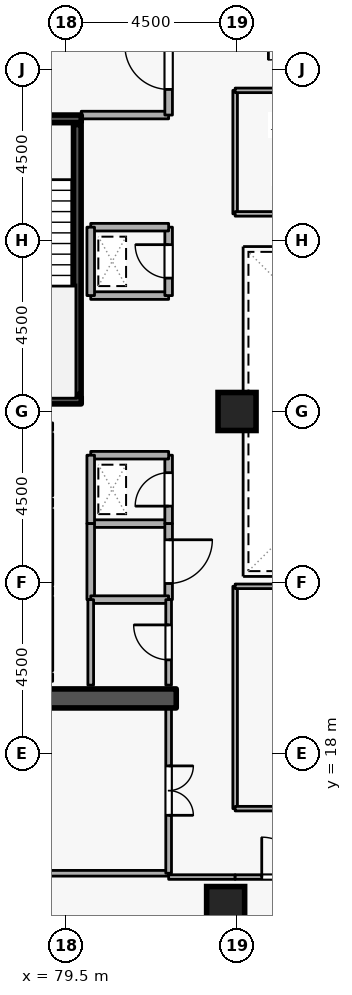
"""IFC4 building model, lengths in metres.
Left out: names, types, materials, properties, quantities, classifications, styles, units other than length and angle.
Written with IfcOpenShell. Run it as: python <this file> out.ifc"""

import sys

from ifc_helpers import new_model, si_unit, direction, frame, frame_2d, origin, origin_2d, place, context, subcontext, project, spatial, rectangle, extrude, element, fill, save


model = new_model("IFC4")
c1 = context("Model", 3, precision=1e-05, world=origin(), true_north=direction((0.0, 1.0)))
c2 = subcontext(c1, "Body", "Model", "MODEL_VIEW")
j1 = project(units=[si_unit("LENGTHUNIT", "METRE"), si_unit("PLANEANGLEUNIT", "RADIAN")], contexts=[c1])
p1 = place(None, origin())
s1 = spatial("IfcSite", under=j1, at=p1, CompositionType="ELEMENT")
p2 = place(p1, origin())
s2 = spatial("IfcBuilding", under=s1, at=p2, CompositionType="ELEMENT")
p3 = place(p2, frame((0.0, 0.0, 229.5)))
s3 = spatial("IfcBuildingStorey", under=s2, at=p3, CompositionType="ELEMENT", Elevation=229.5)
p4 = place(p3, frame((76.6, 19.45, 0.0), z_axis=(0.0, 0.0, 1.0), x_axis=(1.0, 0.0, 0.0)))
e1 = element("IfcWall", 1, at=p4, inside=s3, PredefinedType="SHEAR", context=c2, shape_type="SweptSolid", body=[
    extrude(rectangle(XDim=5.8, YDim=0.5, at=frame_2d((2.9, 0.0))), origin(), (0.0, 0.0, 1.0), 3.6),
])
for number, where, z_axis, x_axis in (
    (2, (83.7, 14.0, 0.0), (0.0, 0.0, 1.0), (1.0, 0.0, 0.0)),
    (3, (84.0, 27.0, 0.0), (0.0, 0.0, 1.0), (1.0, 0.0, 0.0)),
):
    element("IfcColumn", number, at=place(p3, frame(where, z_axis=z_axis, x_axis=x_axis)), inside=s3, PredefinedType="COLUMN", context=c2, shape_type="SweptSolid", body=[
        extrude(rectangle(XDim=1.0, YDim=1.0, at=origin_2d()), origin(), (0.0, 0.0, 1.0), 3.6),
    ])
p5 = place(p3, frame((79.05, 24.78, 0.0), z_axis=(0.0, 0.0, 1.0), x_axis=(0.0, 1.0, 0.0)))
e4 = element("IfcWall", 4, at=p5, inside=s3, PredefinedType="STANDARD", context=c2, shape_type="SweptSolid", body=[
    extrude(rectangle(XDim=1.64, YDim=0.2, at=frame_2d((0.82, 0.0))), origin(), (0.0, 0.0, 1.0), 3.3),
])
p6 = place(p5, frame((0.31, 0.0, 0.0)))
e5 = element("IfcOpeningElement", 5, at=p6, cuts=e4, PredefinedType="OPENING", context=c2, shape_type="SweptSolid", body=[
    extrude(rectangle(XDim=1.02, YDim=2.06, at=frame_2d((0.51, 1.03))), frame((0.0, 0.11, 0.0), z_axis=(0.0, -1.0, 0.0), x_axis=(1.0, 0.0, 0.0)), (0.0, 0.0, 1.0), 0.22),
])
p7 = place(p3, frame((79.05, 22.43, 0.0), z_axis=(0.0, 0.0, 1.0), x_axis=(0.0, 1.0, 0.0)))
e6 = element("IfcWall", 6, at=p7, inside=s3, PredefinedType="STANDARD", context=c2, shape_type="SweptSolid", body=[
    extrude(rectangle(XDim=1.99, YDim=0.2, at=frame_2d((0.995, 0.0))), origin(), (0.0, 0.0, 1.0), 3.3),
])
p8 = place(p7, frame((0.485, 0.0, 0.0)))
e7 = element("IfcOpeningElement", 7, at=p8, cuts=e6, PredefinedType="OPENING", context=c2, shape_type="SweptSolid", body=[
    extrude(rectangle(XDim=1.02, YDim=2.06, at=frame_2d((0.51, 1.03))), frame((0.0, 0.11, 0.0), z_axis=(0.0, -1.0, 0.0), x_axis=(1.0, 0.0, 0.0)), (0.0, 0.0, 1.0), 0.22),
])
p9 = place(p3, frame((79.05, 20.18, 0.0), z_axis=(0.0, 0.0, 1.0), x_axis=(0.0, 1.0, 0.0)))
e8 = element("IfcWall", 8, at=p9, inside=s3, PredefinedType="STANDARD", context=c2, shape_type="SweptSolid", body=[
    extrude(rectangle(XDim=1.94, YDim=0.2, at=frame_2d((0.97, 0.0))), origin(), (0.0, 0.0, 1.0), 3.3),
])
p10 = place(p9, frame((0.46, 0.0, 0.0)))
e9 = element("IfcOpeningElement", 9, at=p10, cuts=e8, PredefinedType="OPENING", context=c2, shape_type="SweptSolid", body=[
    extrude(rectangle(XDim=1.02, YDim=2.06, at=frame_2d((0.51, 1.03))), frame((0.0, 0.11, 0.0), z_axis=(0.0, -1.0, 0.0), x_axis=(1.0, 0.0, 0.0)), (0.0, 0.0, 1.0), 0.22),
])
p11 = place(p3, frame((76.55, 34.7, 0.0), z_axis=(0.0, 0.0, 1.0), x_axis=(1.0, 0.0, 0.0)))
e10 = element("IfcWall", 10, at=p11, inside=s3, PredefinedType="SHEAR", context=c2, shape_type="SweptSolid", body=[
    extrude(rectangle(XDim=3.35, YDim=0.2, at=frame_2d((1.675, 0.0))), origin(), (0.0, 0.0, 1.0), 3.6),
])
p12 = place(p11, frame((1.125, 0.0, 0.0)))
e11 = element("IfcOpeningElement", 11, at=p12, cuts=e10, PredefinedType="OPENING", context=c2, shape_type="SweptSolid", body=[
    extrude(rectangle(XDim=1.1, YDim=2.1, at=frame_2d((0.55, 1.05))), frame((0.0, 0.11, 0.0), z_axis=(0.0, -1.0, 0.0), x_axis=(1.0, 0.0, 0.0)), (0.0, 0.0, 1.0), 0.22),
])
p13 = place(p3, frame((79.9, 27.3, 0.0), z_axis=(0.0, 0.0, 1.0), x_axis=(-1.0, 0.0, 0.0)))
e12 = element("IfcWall", 12, at=p13, inside=s3, PredefinedType="SHEAR", context=c2, shape_type="SweptSolid", body=[
    extrude(rectangle(XDim=3.35, YDim=0.2, at=frame_2d((1.675, 0.0))), origin(), (0.0, 0.0, 1.0), 3.6),
])
p14 = place(p3, frame((79.797, 27.45, 0.0), z_axis=(0.0, 0.0, 1.0), x_axis=(0.0, 1.0, 0.0)))
e13 = element("IfcWall", 13, at=p14, inside=s3, PredefinedType="SHEAR", context=c2, shape_type="SweptSolid", body=[
    extrude(rectangle(XDim=7.1, YDim=0.2, at=frame_2d((3.55, 0.0))), origin(), (0.0, 0.0, 1.0), 3.6),
])
p15 = place(p3, frame((79.9, 34.8, 0.0), z_axis=(0.0, 0.0, 1.0), x_axis=(1.0, 0.0, 0.0)))
e14 = element("IfcWall", 14, at=p15, inside=s3, PredefinedType="STANDARD", context=c2, shape_type="SweptSolid", body=[
    extrude(rectangle(XDim=2.3, YDim=0.2, at=frame_2d((1.15, 0.0))), origin(), (0.0, 0.0, 1.0), 2.505),
])
p16 = place(p3, frame((82.2, 34.8, 0.0), z_axis=(0.0, 0.0, 1.0), x_axis=(0.0, 1.0, 0.0)))
e15 = element("IfcWall", 15, at=p16, inside=s3, PredefinedType="STANDARD", context=c2, shape_type="SweptSolid", body=[
    extrude(rectangle(XDim=2.5, YDim=0.2, at=frame_2d((1.25, 0.0))), origin(), (0.0, 0.0, 1.0), 3.3),
])
p17 = place(p16, frame((0.675, 0.0, 0.0)))
e16 = element("IfcOpeningElement", 16, at=p17, cuts=e15, PredefinedType="OPENING", context=c2, shape_type="SweptSolid", body=[
    extrude(rectangle(XDim=1.15, YDim=2.1, at=frame_2d((0.575, 1.05))), frame((0.0, 0.11, 0.0), z_axis=(0.0, -1.0, 0.0), x_axis=(1.0, 0.0, 0.0)), (0.0, 0.0, 1.0), 0.22),
])
p18 = place(p3, frame((80.15, 24.05, 0.0), z_axis=(0.0, 0.0, 1.0), x_axis=(1.0, 0.0, 0.0)))
e17 = element("IfcWall", 17, at=p18, inside=s3, PredefinedType="STANDARD", context=c2, shape_type="SweptSolid", body=[
    extrude(rectangle(XDim=2.05, YDim=0.2, at=frame_2d((1.025, 0.0))), origin(), (0.0, 0.0, 1.0), 3.3),
])
p19 = place(p3, frame((82.2, 24.05, 0.0), z_axis=(0.0, 0.0, 1.0), x_axis=(0.0, 1.0, 0.0)))
e18 = element("IfcWall", 18, at=p19, inside=s3, PredefinedType="STANDARD", context=c2, shape_type="SweptSolid", body=[
    extrude(rectangle(XDim=1.8, YDim=0.2, at=frame_2d((0.9, 0.0))), origin(), (0.0, 0.0, 1.0), 3.3),
])
p20 = place(p19, frame((0.46, 0.0, 0.0)))
e19 = element("IfcOpeningElement", 19, at=p20, cuts=e18, PredefinedType="OPENING", context=c2, shape_type="SweptSolid", body=[
    extrude(rectangle(XDim=0.88, YDim=2.04, at=frame_2d((0.44, 1.02))), frame((0.0, 0.11, 0.0), z_axis=(0.0, -1.0, 0.0), x_axis=(1.0, 0.0, 0.0)), (0.0, 0.0, 1.0), 0.22),
])
p21 = place(p3, frame((82.2, 25.85, 0.0), z_axis=(0.0, 0.0, 1.0), x_axis=(-1.0, 0.0, 0.0)))
e20 = element("IfcWall", 20, at=p21, inside=s3, PredefinedType="STANDARD", context=c2, shape_type="SweptSolid", body=[
    extrude(rectangle(XDim=2.05, YDim=0.2, at=frame_2d((1.025, 0.0))), origin(), (0.0, 0.0, 1.0), 3.3),
])
p22 = place(p3, frame((80.15, 25.85, 0.0), z_axis=(0.0, 0.0, 1.0), x_axis=(0.0, -1.0, 0.0)))
e21 = element("IfcWall", 21, at=p22, inside=s3, PredefinedType="STANDARD", context=c2, shape_type="SweptSolid", body=[
    extrude(rectangle(XDim=1.8, YDim=0.2, at=frame_2d((0.9, 0.0))), origin(), (0.0, 0.0, 1.0), 3.3),
])
p23 = place(p3, frame((80.15, 30.05, 0.0), z_axis=(0.0, 0.0, 1.0), x_axis=(1.0, 0.0, 0.0)))
e22 = element("IfcWall", 22, at=p23, inside=s3, PredefinedType="STANDARD", context=c2, shape_type="SweptSolid", body=[
    extrude(rectangle(XDim=2.05, YDim=0.2, at=frame_2d((1.025, 0.0))), origin(), (0.0, 0.0, 1.0), 3.3),
])
p24 = place(p3, frame((82.2, 30.05, 0.0), z_axis=(0.0, 0.0, 1.0), x_axis=(0.0, 1.0, 0.0)))
e23 = element("IfcWall", 23, at=p24, inside=s3, PredefinedType="STANDARD", context=c2, shape_type="SweptSolid", body=[
    extrude(rectangle(XDim=1.8, YDim=0.2, at=frame_2d((0.9, 0.0))), origin(), (0.0, 0.0, 1.0), 3.3),
])
p25 = place(p24, frame((0.46, 0.0, 0.0)))
e24 = element("IfcOpeningElement", 24, at=p25, cuts=e23, PredefinedType="OPENING", context=c2, shape_type="SweptSolid", body=[
    extrude(rectangle(XDim=0.88, YDim=2.04, at=frame_2d((0.44, 1.02))), frame((0.0, 0.11, 0.0), z_axis=(0.0, -1.0, 0.0), x_axis=(1.0, 0.0, 0.0)), (0.0, 0.0, 1.0), 0.22),
])
p26 = place(p3, frame((82.2, 31.85, 0.0), z_axis=(0.0, 0.0, 1.0), x_axis=(-1.0, 0.0, 0.0)))
e25 = element("IfcWall", 25, at=p26, inside=s3, PredefinedType="STANDARD", context=c2, shape_type="SweptSolid", body=[
    extrude(rectangle(XDim=2.05, YDim=0.2, at=frame_2d((1.025, 0.0))), origin(), (0.0, 0.0, 1.0), 3.3),
])
p27 = place(p3, frame((80.15, 31.85, 0.0), z_axis=(0.0, 0.0, 1.0), x_axis=(0.0, -1.0, 0.0)))
e26 = element("IfcWall", 26, at=p27, inside=s3, PredefinedType="STANDARD", context=c2, shape_type="SweptSolid", body=[
    extrude(rectangle(XDim=1.8, YDim=0.2, at=frame_2d((0.9, 0.0))), origin(), (0.0, 0.0, 1.0), 3.3),
])
p28 = place(p3, frame((80.15, 22.05, 0.0), z_axis=(0.0, 0.0, 1.0), x_axis=(0.0, 1.0, 0.0)))
e27 = element("IfcWall", 27, at=p28, inside=s3, PredefinedType="STANDARD", context=c2, shape_type="SweptSolid", body=[
    extrude(rectangle(XDim=2.0, YDim=0.2, at=frame_2d((1.0, 0.0))), origin(), (0.0, 0.0, 1.0), 3.3),
])
p29 = place(p3, frame((82.2, 24.05, 0.0), z_axis=(0.0, 0.0, 1.0), x_axis=(0.0, -1.0, 0.0)))
e28 = element("IfcWall", 28, at=p29, inside=s3, PredefinedType="STANDARD", context=c2, shape_type="SweptSolid", body=[
    extrude(rectangle(XDim=2.0, YDim=0.2, at=frame_2d((1.0, 0.0))), origin(), (0.0, 0.0, 1.0), 3.3),
])
p30 = place(p29, frame((0.425, 0.0, 0.0)))
e29 = element("IfcOpeningElement", 29, at=p30, cuts=e28, PredefinedType="OPENING", context=c2, shape_type="SweptSolid", body=[
    extrude(rectangle(XDim=1.15, YDim=2.1, at=frame_2d((0.575, 1.05))), frame((0.0, 0.11, 0.0), z_axis=(0.0, -1.0, 0.0), x_axis=(1.0, 0.0, 0.0)), (0.0, 0.0, 1.0), 0.22),
])
p31 = place(p3, frame((82.2, 22.05, 0.0), z_axis=(0.0, 0.0, 1.0), x_axis=(-1.0, 0.0, 0.0)))
e30 = element("IfcWall", 30, at=p31, inside=s3, PredefinedType="STANDARD", context=c2, shape_type="SweptSolid", body=[
    extrude(rectangle(XDim=2.05, YDim=0.2, at=frame_2d((1.025, 0.0))), origin(), (0.0, 0.0, 1.0), 3.3),
])
p32 = place(p3, frame((82.2, 19.8, 0.0), z_axis=(0.0, 0.0, 1.0), x_axis=(0.0, 1.0, 0.0)))
e31 = element("IfcWall", 31, at=p32, inside=s3, PredefinedType="PARTITIONING", context=c2, shape_type="SweptSolid", body=[
    extrude(rectangle(XDim=2.25, YDim=0.15, at=frame_2d((1.125, 0.0))), origin(), (0.0, 0.0, 1.0), 3.3),
])
p33 = place(p32, frame((0.665, 0.0, 0.0)))
e32 = element("IfcOpeningElement", 32, at=p33, cuts=e31, PredefinedType="OPENING", context=c2, shape_type="SweptSolid", body=[
    extrude(rectangle(XDim=0.92, YDim=2.08, at=frame_2d((0.46, 1.04))), frame((0.0, 0.085, 0.0), z_axis=(0.0, -1.0, 0.0), x_axis=(1.0, 0.0, 0.0)), (0.0, 0.0, 1.0), 0.17),
])
p34 = place(p3, frame((80.15, 22.05, 0.0), z_axis=(0.0, 0.0, 1.0), x_axis=(0.0, -1.0, 0.0)))
e33 = element("IfcWall", 33, at=p34, inside=s3, PredefinedType="PARTITIONING", context=c2, shape_type="SweptSolid", body=[
    extrude(rectangle(XDim=2.25, YDim=0.15, at=frame_2d((1.125, 0.0))), origin(), (0.0, 0.0, 1.0), 3.3),
])
p35 = place(p3, frame((82.2, 14.85, 0.0), z_axis=(0.0, 0.0, 1.0), x_axis=(-1.0, 0.0, 0.0)))
e34 = element("IfcWall", 34, at=p35, inside=s3, PredefinedType="PARTITIONING", context=c2, shape_type="SweptSolid", body=[
    extrude(rectangle(XDim=11.42, YDim=0.15, at=frame_2d((5.71, 0.0))), origin(), (0.0, 0.0, 1.0), 3.3),
])
p36 = place(p3, frame((82.2, 19.2, 0.0), z_axis=(0.0, 0.0, 1.0), x_axis=(0.0, -1.0, 0.0)))
e35 = element("IfcWall", 35, at=p36, inside=s3, PredefinedType="PARTITIONING", context=c2, shape_type="SweptSolid", body=[
    extrude(rectangle(XDim=4.35, YDim=0.15, at=frame_2d((2.175, 0.0))), origin(), (0.0, 0.0, 1.0), 3.3),
])
p37 = place(p36, frame((1.525, 0.0, 0.0)))
e36 = element("IfcOpeningElement", 36, at=p37, cuts=e35, PredefinedType="OPENING", context=c2, shape_type="SweptSolid", body=[
    extrude(rectangle(XDim=1.3, YDim=2.12, at=frame_2d((0.65, 1.06))), frame((0.0, 0.085, 0.0), z_axis=(0.0, -1.0, 0.0), x_axis=(1.0, 0.0, 0.0)), (0.0, 0.0, 1.0), 0.17),
])
p38 = place(p3, frame((82.2, 14.75, 0.0), z_axis=(0.0, 0.0, 1.0), x_axis=(1.0, 0.0, 0.0)))
e37 = element("IfcWall", 37, at=p38, inside=s3, PredefinedType="PARTITIONING", context=c2, shape_type="SweptSolid", body=[
    extrude(rectangle(XDim=1.75, YDim=0.12, at=frame_2d((0.875, 0.0))), origin(), (0.0, 0.0, 1.0), 3.3),
])
p39 = place(p3, frame((83.95, 14.75, 0.0), z_axis=(0.0, 0.0, 1.0), x_axis=(1.0, 0.0, 0.0)))
e38 = element("IfcWall", 38, at=p39, inside=s3, PredefinedType="PARTITIONING", context=c2, shape_type="SweptSolid", body=[
    extrude(rectangle(XDim=2.45, YDim=0.12, at=frame_2d((1.225, 0.0))), origin(), (0.0, 0.0, 1.0), 3.3),
])
p40 = place(p39, frame((0.7, 0.0, 0.0)))
e39 = element("IfcOpeningElement", 39, at=p40, cuts=e38, PredefinedType="OPENING", context=c2, shape_type="SweptSolid", body=[
    extrude(rectangle(XDim=1.05, YDim=2.1, at=frame_2d((0.525, 1.05))), frame((0.0, 0.07, 0.0), z_axis=(0.0, -1.0, 0.0), x_axis=(1.0, 0.0, 0.0)), (0.0, 0.0, 1.0), 0.14),
])
p41 = place(p3, frame((83.95, 16.55, 0.0), z_axis=(0.0, 0.0, 1.0), x_axis=(0.0, 1.0, 0.0)))
e40 = element("IfcWall", 40, at=p41, inside=s3, PredefinedType="PARTITIONING", context=c2, shape_type="SweptSolid", body=[
    extrude(rectangle(XDim=5.85, YDim=0.12, at=frame_2d((2.925, 0.0))), origin(), (0.0, 0.0, 1.0), 3.3),
])
p42 = place(p3, frame((83.95, 22.4, 0.0), z_axis=(0.0, 0.0, 1.0), x_axis=(1.0, 0.0, 0.0)))
e41 = element("IfcWall", 41, at=p42, inside=s3, PredefinedType="PARTITIONING", context=c2, shape_type="SweptSolid", body=[
    extrude(rectangle(XDim=9.1, YDim=0.12, at=frame_2d((4.55, 0.0))), origin(), (0.0, 0.0, 1.0), 3.3),
])
p43 = place(p3, frame((93.05, 16.55, 0.0), z_axis=(0.0, 0.0, 1.0), x_axis=(-1.0, 0.0, 0.0)))
e42 = element("IfcWall", 42, at=p43, inside=s3, PredefinedType="PARTITIONING", context=c2, shape_type="SweptSolid", body=[
    extrude(rectangle(XDim=9.1, YDim=0.12, at=frame_2d((4.55, 0.0))), origin(), (0.0, 0.0, 1.0), 3.3),
])
p44 = place(p43, frame((4.075, 0.0, 0.0)))
e43 = element("IfcOpeningElement", 43, at=p44, cuts=e42, PredefinedType="OPENING", context=c2, shape_type="SweptSolid", body=[
    extrude(rectangle(XDim=0.95, YDim=2.1, at=frame_2d((0.475, 1.05))), frame((0.0, 0.07, 0.0), z_axis=(0.0, -1.0, 0.0), x_axis=(1.0, 0.0, 0.0)), (0.0, 0.0, 1.0), 0.14),
])
p45 = place(p3, frame((83.95, 32.2, 0.0), z_axis=(0.0, 0.0, 1.0), x_axis=(0.0, 1.0, 0.0)))
e44 = element("IfcWall", 44, at=p45, inside=s3, PredefinedType="PARTITIONING", context=c2, shape_type="SweptSolid", body=[
    extrude(rectangle(XDim=3.25, YDim=0.12, at=frame_2d((1.625, 0.0))), origin(), (0.0, 0.0, 1.0), 3.3),
])
p46 = place(p3, frame((83.95, 35.45, 0.0), z_axis=(0.0, 0.0, 1.0), x_axis=(1.0, 0.0, 0.0)))
e45 = element("IfcWall", 45, at=p46, inside=s3, PredefinedType="PARTITIONING", context=c2, shape_type="SweptSolid", body=[
    extrude(rectangle(XDim=9.1, YDim=0.12, at=frame_2d((4.55, 0.0))), origin(), (0.0, 0.0, 1.0), 3.3),
])
p47 = place(p46, frame((4.075, 0.0, 0.0)))
e46 = element("IfcOpeningElement", 46, at=p47, cuts=e45, PredefinedType="OPENING", context=c2, shape_type="SweptSolid", body=[
    extrude(rectangle(XDim=0.95, YDim=2.1, at=frame_2d((0.475, 1.05))), frame((0.0, 0.07, 0.0), z_axis=(0.0, -1.0, 0.0), x_axis=(1.0, 0.0, 0.0)), (0.0, 0.0, 1.0), 0.14),
])
p48 = place(p3, frame((93.05, 32.2, 0.0), z_axis=(0.0, 0.0, 1.0), x_axis=(-1.0, 0.0, 0.0)))
e47 = element("IfcWall", 47, at=p48, inside=s3, PredefinedType="PARTITIONING", context=c2, shape_type="SweptSolid", body=[
    extrude(rectangle(XDim=9.1, YDim=0.12, at=frame_2d((4.55, 0.0))), origin(), (0.0, 0.0, 1.0), 3.3),
])
p49 = place(p17, origin())
e48 = element("IfcDoor", 48, at=p49, inside=s3, OperationType="SINGLE_SWING_RIGHT", PredefinedType="DOOR", context=c2, shape_type="SweptSolid", body=[
    extrude(rectangle(XDim=1.15, YDim=2.1, at=frame_2d((0.575, 1.05))), frame((0.0, 0.025, 0.0), z_axis=(0.0, -1.0, 0.0), x_axis=(1.0, 0.0, 0.0)), (0.0, 0.0, 1.0), 0.05),
])
fill(e16, e48)
p50 = place(p20, origin())
e49 = element("IfcDoor", 49, at=p50, inside=s3, OperationType="SINGLE_SWING_LEFT", PredefinedType="DOOR", context=c2, shape_type="SweptSolid", body=[
    extrude(rectangle(XDim=0.88, YDim=2.04, at=frame_2d((0.44, 1.02))), frame((0.0, 0.025, 0.0), z_axis=(0.0, -1.0, 0.0), x_axis=(1.0, 0.0, 0.0)), (0.0, 0.0, 1.0), 0.05),
])
fill(e19, e49)
p51 = place(p25, origin())
e50 = element("IfcDoor", 50, at=p51, inside=s3, OperationType="SINGLE_SWING_RIGHT", PredefinedType="DOOR", context=c2, shape_type="SweptSolid", body=[
    extrude(rectangle(XDim=0.88, YDim=2.04, at=frame_2d((0.44, 1.02))), frame((0.0, 0.025, 0.0), z_axis=(0.0, -1.0, 0.0), x_axis=(1.0, 0.0, 0.0)), (0.0, 0.0, 1.0), 0.05),
])
fill(e24, e50)
p52 = place(p33, origin())
e51 = element("IfcDoor", 51, at=p52, inside=s3, OperationType="SINGLE_SWING_RIGHT", PredefinedType="DOOR", context=c2, shape_type="SweptSolid", body=[
    extrude(rectangle(XDim=0.92, YDim=2.08, at=frame_2d((0.46, 1.04))), frame((0.0, 0.025, 0.0), z_axis=(0.0, -1.0, 0.0), x_axis=(1.0, 0.0, 0.0)), (0.0, 0.0, 1.0), 0.05),
])
fill(e32, e51)
p53 = place(p30, origin())
e52 = element("IfcDoor", 52, at=p53, inside=s3, OperationType="SINGLE_SWING_LEFT", PredefinedType="DOOR", context=c2, shape_type="SweptSolid", body=[
    extrude(rectangle(XDim=1.15, YDim=2.1, at=frame_2d((0.575, 1.05))), frame((0.0, 0.025, 0.0), z_axis=(0.0, -1.0, 0.0), x_axis=(1.0, 0.0, 0.0)), (0.0, 0.0, 1.0), 0.05),
])
fill(e29, e52)
p54 = place(p37, origin())
e53 = element("IfcDoor", 53, at=p54, inside=s3, OperationType="DOUBLE_DOOR_SINGLE_SWING", PredefinedType="DOOR", context=c2, shape_type="SweptSolid", body=[
    extrude(rectangle(XDim=1.3, YDim=2.12, at=frame_2d((0.65, 1.06))), frame((0.0, 0.025, 0.0), z_axis=(0.0, -1.0, 0.0), x_axis=(1.0, 0.0, 0.0)), (0.0, 0.0, 1.0), 0.05),
])
fill(e36, e53)
p55 = place(p40, origin())
e54 = element("IfcDoor", 54, at=p55, inside=s3, OperationType="SINGLE_SWING_LEFT", PredefinedType="DOOR", context=c2, shape_type="SweptSolid", body=[
    extrude(rectangle(XDim=1.05, YDim=2.1, at=frame_2d((0.525, 1.05))), frame((0.0, 0.025, 0.0), z_axis=(0.0, -1.0, 0.0), x_axis=(1.0, 0.0, 0.0)), (0.0, 0.0, 1.0), 0.05),
])
fill(e39, e54)
save(model, sys.argv[1])
